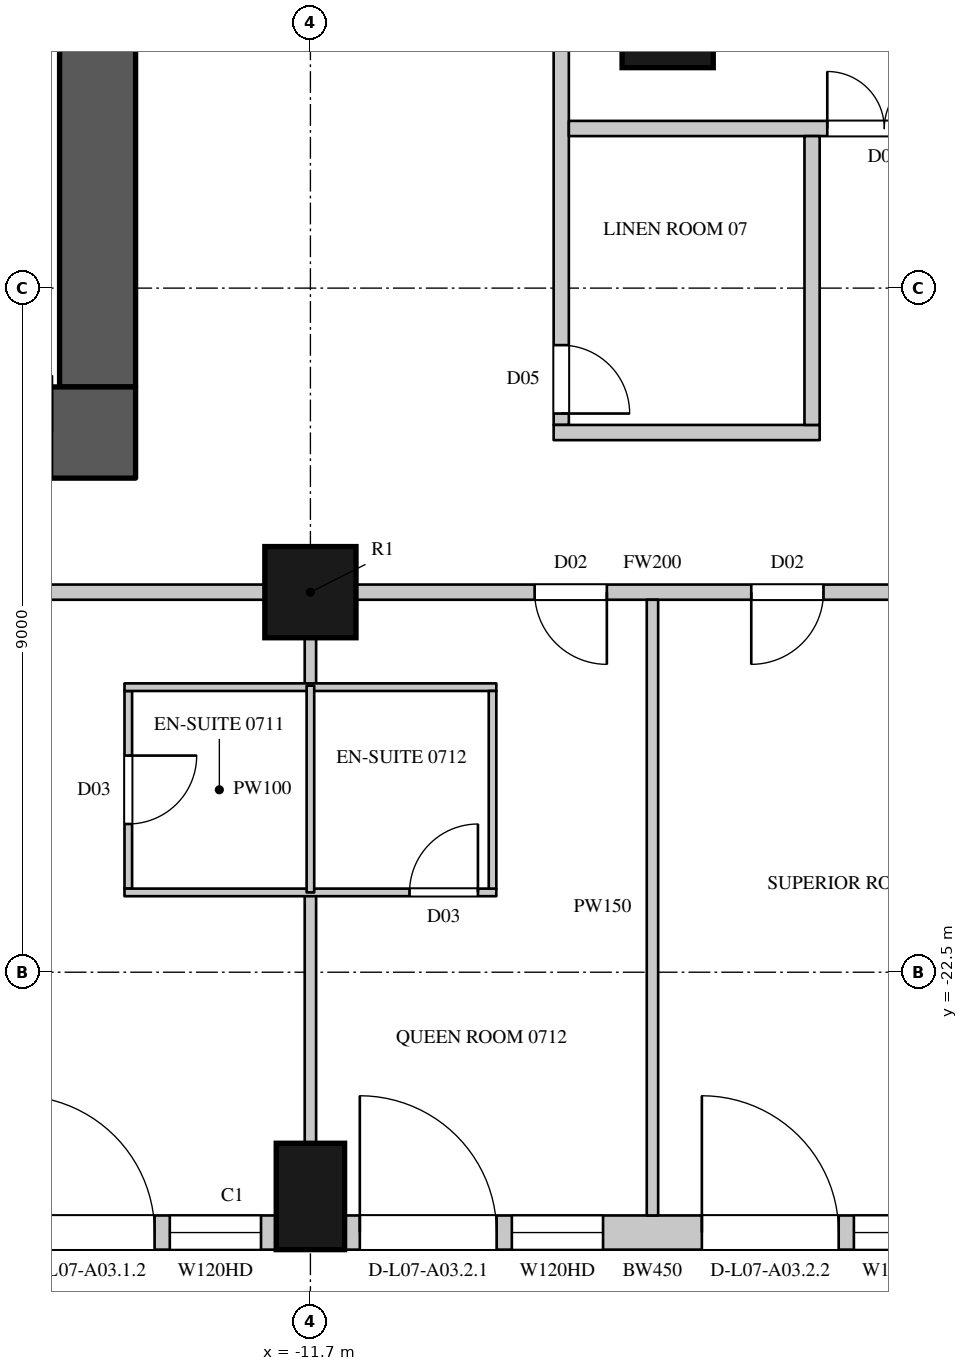
"""IFC4 building model, lengths in metres.
Left out: names, types, materials, properties, quantities, classifications, styles, units other than length and angle.
Written with IfcOpenShell. Run it as: python <this file> out.ifc"""

import sys

from ifc_helpers import new_model, si_unit, direction, frame, frame_2d, origin, origin_2d, place, context, subcontext, project, spatial, rectangle, circle, extrude, element, fill, save


model = new_model("IFC4")
c1 = context("Model", 3, precision=1e-05, world=origin(), true_north=direction((0.0, 1.0)))
c2 = subcontext(c1, "Body", "Model", "MODEL_VIEW")
j1 = project(units=[si_unit("LENGTHUNIT", "METRE"), si_unit("PLANEANGLEUNIT", "RADIAN")], contexts=[c1])
p1 = place(None, origin())
s1 = spatial("IfcSite", under=j1, at=p1, CompositionType="ELEMENT")
p2 = place(p1, origin())
s2 = spatial("IfcBuilding", under=s1, at=p2, CompositionType="ELEMENT")
p3 = place(p2, frame((0.0, 0.0, 55.5)))
s3 = spatial("IfcBuildingStorey", under=s2, at=p3, CompositionType="ELEMENT", Elevation=55.5)
p4 = place(p3, frame((-11.7, -25.45, 0.0), z_axis=(0.0, 0.0, 1.0), x_axis=(1.0, 0.0, 0.0)))
e1 = element("IfcColumn", 1, at=p4, inside=s3, PredefinedType="COLUMN", context=c2, shape_type="SweptSolid", body=[
    extrude(rectangle(XDim=0.9, YDim=1.4, at=origin_2d()), origin(), (0.0, 0.0, 1.0), 3.6),
])
for number, where, z_axis, x_axis in (
    (2, (-11.7, -17.5, 0.0), (0.0, 0.0, 1.0), (1.0, 0.0, 0.0)),
    (3, (-7.0, -10.0, 0.0), (0.0, 0.0, 1.0), (1.0, 0.0, 0.0)),
):
    element("IfcColumn", number, at=place(p3, frame(where, z_axis=z_axis, x_axis=x_axis)), inside=s3, PredefinedType="COLUMN", context=c2, shape_type="SweptSolid", body=[
        extrude(circle(Radius=0.6, at=origin_2d()), origin(), (0.0, 0.0, 1.0), 3.6),
    ])
p5 = place(p3, frame((-20.25, -25.925, 0.0), z_axis=(0.0, 0.0, 1.0), x_axis=(1.0, 0.0, 0.0)))
e4 = element("IfcWall", 4, at=p5, inside=s3, PredefinedType="SOLIDWALL", context=c2, shape_type="SweptSolid", body=[
    extrude(rectangle(XDim=8.1, YDim=0.45, at=frame_2d((4.05, 0.0))), origin(), (0.0, 0.0, 1.0), 3.3),
])
p6 = place(p5, frame((0.2, 0.0, 0.0)))
e5 = element("IfcOpeningElement", 5, at=p6, cuts=e4, PredefinedType="OPENING", context=c2, shape_type="SweptSolid", body=[
    extrude(rectangle(XDim=1.8, YDim=2.4, at=frame_2d((0.9, 1.2))), frame((0.0, 0.235, 0.0), z_axis=(0.0, -1.0, 0.0), x_axis=(1.0, 0.0, 0.0)), (0.0, 0.0, 1.0), 0.47),
])
p7 = place(p5, frame((2.2, 0.0, 1.05)))
e6 = element("IfcOpeningElement", 6, at=p7, cuts=e4, PredefinedType="OPENING", context=c2, shape_type="SweptSolid", body=[
    extrude(rectangle(XDim=1.2, YDim=2.0, at=frame_2d((0.6, 1.0))), frame((0.0, 0.235, 0.0), z_axis=(0.0, -1.0, 0.0), x_axis=(1.0, 0.0, 0.0)), (0.0, 0.0, 1.0), 0.47),
])
p8 = place(p5, frame((4.7, 0.0, 0.0)))
e7 = element("IfcOpeningElement", 7, at=p8, cuts=e4, PredefinedType="OPENING", context=c2, shape_type="SweptSolid", body=[
    extrude(rectangle(XDim=1.8, YDim=2.4, at=frame_2d((0.9, 1.2))), frame((0.0, 0.235, 0.0), z_axis=(0.0, -1.0, 0.0), x_axis=(1.0, 0.0, 0.0)), (0.0, 0.0, 1.0), 0.47),
])
p9 = place(p5, frame((6.7, 0.0, 1.05)))
e8 = element("IfcOpeningElement", 8, at=p9, cuts=e4, PredefinedType="OPENING", context=c2, shape_type="SweptSolid", body=[
    extrude(rectangle(XDim=1.2, YDim=2.0, at=frame_2d((0.6, 1.0))), frame((0.0, 0.235, 0.0), z_axis=(0.0, -1.0, 0.0), x_axis=(1.0, 0.0, 0.0)), (0.0, 0.0, 1.0), 0.47),
])
p10 = place(p3, frame((-11.25, -25.925, 0.0), z_axis=(0.0, 0.0, 1.0), x_axis=(1.0, 0.0, 0.0)))
e9 = element("IfcWall", 9, at=p10, inside=s3, PredefinedType="SOLIDWALL", context=c2, shape_type="SweptSolid", body=[
    extrude(rectangle(XDim=8.1, YDim=0.45, at=frame_2d((4.05, 0.0))), origin(), (0.0, 0.0, 1.0), 3.3),
])
p11 = place(p10, frame((0.2, 0.0, 0.0)))
e10 = element("IfcOpeningElement", 10, at=p11, cuts=e9, PredefinedType="OPENING", context=c2, shape_type="SweptSolid", body=[
    extrude(rectangle(XDim=1.8, YDim=2.4, at=frame_2d((0.9, 1.2))), frame((0.0, 0.235, 0.0), z_axis=(0.0, -1.0, 0.0), x_axis=(1.0, 0.0, 0.0)), (0.0, 0.0, 1.0), 0.47),
])
p12 = place(p10, frame((2.2, 0.0, 1.05)))
e11 = element("IfcOpeningElement", 11, at=p12, cuts=e9, PredefinedType="OPENING", context=c2, shape_type="SweptSolid", body=[
    extrude(rectangle(XDim=1.2, YDim=2.0, at=frame_2d((0.6, 1.0))), frame((0.0, 0.235, 0.0), z_axis=(0.0, -1.0, 0.0), x_axis=(1.0, 0.0, 0.0)), (0.0, 0.0, 1.0), 0.47),
])
p13 = place(p10, frame((4.7, 0.0, 0.0)))
e12 = element("IfcOpeningElement", 12, at=p13, cuts=e9, PredefinedType="OPENING", context=c2, shape_type="SweptSolid", body=[
    extrude(rectangle(XDim=1.8, YDim=2.4, at=frame_2d((0.9, 1.2))), frame((0.0, 0.235, 0.0), z_axis=(0.0, -1.0, 0.0), x_axis=(1.0, 0.0, 0.0)), (0.0, 0.0, 1.0), 0.47),
])
p14 = place(p10, frame((6.7, 0.0, 1.05)))
e13 = element("IfcOpeningElement", 13, at=p14, cuts=e9, PredefinedType="OPENING", context=c2, shape_type="SweptSolid", body=[
    extrude(rectangle(XDim=1.2, YDim=2.0, at=frame_2d((0.6, 1.0))), frame((0.0, 0.235, 0.0), z_axis=(0.0, -1.0, 0.0), x_axis=(1.0, 0.0, 0.0)), (0.0, 0.0, 1.0), 0.47),
])
p15 = place(p3, frame((-30.0, -15.4, 0.0), z_axis=(0.0, 0.0, 1.0), x_axis=(1.0, 0.0, 0.0)))
e14 = element("IfcWall", 14, at=p15, inside=s3, PredefinedType="SHEAR", context=c2, shape_type="SweptSolid", body=[
    extrude(rectangle(XDim=16.0, YDim=1.2, at=frame_2d((8.0, 0.0))), origin(), (0.0, 0.0, 1.0), 3.6),
])
p16 = place(p15, frame((13.4, 0.0, 0.0)))
e15 = element("IfcOpeningElement", 15, at=p16, cuts=e14, PredefinedType="OPENING", context=c2, shape_type="SweptSolid", body=[
    extrude(rectangle(XDim=1.5, YDim=2.4, at=frame_2d((0.75, 1.2))), frame((0.0, 0.61, 0.0), z_axis=(0.0, -1.0, 0.0), x_axis=(1.0, 0.0, 0.0)), (0.0, 0.0, 1.0), 1.22),
])
p17 = place(p3, frame((-14.5, -14.8, 0.0), z_axis=(0.0, 0.0, 1.0), x_axis=(0.0, 1.0, 0.0)))
e16 = element("IfcWall", 16, at=p17, inside=s3, PredefinedType="SHEAR", context=c2, shape_type="SweptSolid", body=[
    extrude(rectangle(XDim=29.6, YDim=1.0, at=frame_2d((14.8, 0.0))), origin(), (0.0, 0.0, 1.0), 3.6),
])
p18 = place(p17, frame((8.45, 0.0, 0.0)))
e17 = element("IfcOpeningElement", 17, at=p18, cuts=e16, PredefinedType="OPENING", context=c2, shape_type="SweptSolid", body=[
    extrude(rectangle(XDim=1.5, YDim=2.4, at=frame_2d((0.75, 1.2))), frame((0.0, 0.51, 0.0), z_axis=(0.0, -1.0, 0.0), x_axis=(1.0, 0.0, 0.0)), (0.0, 0.0, 1.0), 1.02),
])
p19 = place(p17, frame((19.65, 0.0, 0.0)))
e18 = element("IfcOpeningElement", 18, at=p19, cuts=e16, PredefinedType="OPENING", context=c2, shape_type="SweptSolid", body=[
    extrude(rectangle(XDim=1.5, YDim=2.4, at=frame_2d((0.75, 1.2))), frame((0.0, 0.51, 0.0), z_axis=(0.0, -1.0, 0.0), x_axis=(1.0, 0.0, 0.0)), (0.0, 0.0, 1.0), 1.02),
])
p20 = place(p17, frame((14.5, 0.0, 0.0)))
e19 = element("IfcOpeningElement", 19, at=p20, cuts=e16, PredefinedType="OPENING", context=c2, shape_type="SweptSolid", body=[
    extrude(rectangle(XDim=0.6, YDim=2.0, at=frame_2d((0.3, 1.0))), frame((0.0, 0.51, 0.0), z_axis=(0.0, -1.0, 0.0), x_axis=(1.0, 0.0, 0.0)), (0.0, 0.0, 1.0), 1.02),
])
p21 = place(p3, frame((-18.8, -17.5, 0.0), z_axis=(0.0, 0.0, 1.0), x_axis=(1.0, 0.0, 0.0)))
e20 = element("IfcWall", 20, at=p21, inside=s3, PredefinedType="PARTITIONING", context=c2, shape_type="SweptSolid", body=[
    extrude(rectangle(XDim=6.5, YDim=0.2, at=frame_2d((3.25, 0.0))), origin(), (0.0, 0.0, 1.0), 2.75),
])
p22 = place(p3, frame((-11.1, -17.5, 0.0), z_axis=(0.0, 0.0, 1.0), x_axis=(1.0, 0.0, 0.0)))
e21 = element("IfcWall", 21, at=p22, inside=s3, PredefinedType="PARTITIONING", context=c2, shape_type="SweptSolid", body=[
    extrude(rectangle(XDim=7.8, YDim=0.2, at=frame_2d((3.9, 0.0))), origin(), (0.0, 0.0, 1.0), 2.75),
])
p23 = place(p22, frame((2.35, 0.0, 0.0)))
e22 = element("IfcOpeningElement", 22, at=p23, cuts=e21, PredefinedType="OPENING", context=c2, shape_type="SweptSolid", body=[
    extrude(rectangle(XDim=0.95, YDim=2.2, at=frame_2d((0.475, 1.1))), frame((0.0, 0.11, 0.0), z_axis=(0.0, -1.0, 0.0), x_axis=(1.0, 0.0, 0.0)), (0.0, 0.0, 1.0), 0.22),
])
p24 = place(p22, frame((5.2, 0.0, 0.0)))
e23 = element("IfcOpeningElement", 23, at=p24, cuts=e21, PredefinedType="OPENING", context=c2, shape_type="SweptSolid", body=[
    extrude(rectangle(XDim=0.95, YDim=2.2, at=frame_2d((0.475, 1.1))), frame((0.0, 0.11, 0.0), z_axis=(0.0, -1.0, 0.0), x_axis=(1.0, 0.0, 0.0)), (0.0, 0.0, 1.0), 0.22),
])
p25 = place(p3, frame((-8.4, -15.3, 0.0), z_axis=(0.0, 0.0, 1.0), x_axis=(0.0, 1.0, 0.0)))
e24 = element("IfcWall", 24, at=p25, inside=s3, PredefinedType="PARTITIONING", context=c2, shape_type="SweptSolid", body=[
    extrude(rectangle(XDim=30.6, YDim=0.2, at=frame_2d((15.3, 0.0))), origin(), (0.0, 0.0, 1.0), 3.3),
])
p26 = place(p25, frame((19.05, 0.0, 0.0)))
e25 = element("IfcOpeningElement", 25, at=p26, cuts=e24, PredefinedType="OPENING", context=c2, shape_type="SweptSolid", body=[
    extrude(rectangle(XDim=1.5, YDim=2.2, at=frame_2d((0.75, 1.1))), frame((0.0, 0.11, 0.0), z_axis=(0.0, -1.0, 0.0), x_axis=(1.0, 0.0, 0.0)), (0.0, 0.0, 1.0), 0.22),
])
p27 = place(p25, frame((29.55, 0.0, 0.0)))
e26 = element("IfcOpeningElement", 26, at=p27, cuts=e24, PredefinedType="OPENING", context=c2, shape_type="SweptSolid", body=[
    extrude(rectangle(XDim=0.9, YDim=2.2, at=frame_2d((0.45, 1.1))), frame((0.0, 0.11, 0.0), z_axis=(0.0, -1.0, 0.0), x_axis=(1.0, 0.0, 0.0)), (0.0, 0.0, 1.0), 0.22),
])
p28 = place(p25, frame((0.15, 0.0, 0.0)))
e27 = element("IfcOpeningElement", 27, at=p28, cuts=e24, PredefinedType="OPENING", context=c2, shape_type="SweptSolid", body=[
    extrude(rectangle(XDim=0.9, YDim=2.2, at=frame_2d((0.45, 1.1))), frame((0.0, 0.11, 0.0), z_axis=(0.0, -1.0, 0.0), x_axis=(1.0, 0.0, 0.0)), (0.0, 0.0, 1.0), 0.22),
])
p29 = place(p3, frame((-8.5, -15.4, 0.0), z_axis=(0.0, 0.0, 1.0), x_axis=(1.0, 0.0, 0.0)))
e28 = element("IfcWall", 28, at=p29, inside=s3, PredefinedType="PARTITIONING", context=c2, shape_type="SweptSolid", body=[
    extrude(rectangle(XDim=3.5, YDim=0.2, at=frame_2d((1.75, 0.0))), origin(), (0.0, 0.0, 1.0), 3.3),
])
p30 = place(p3, frame((-8.3, -11.4, 0.0), z_axis=(0.0, 0.0, 1.0), x_axis=(1.0, 0.0, 0.0)))
e29 = element("IfcWall", 29, at=p30, inside=s3, PredefinedType="PARTITIONING", context=c2, shape_type="SweptSolid", body=[
    extrude(rectangle(XDim=18.7, YDim=0.2, at=frame_2d((9.35, 0.0))), origin(), (0.0, 0.0, 1.0), 3.3),
])
p31 = place(p30, frame((3.4, 0.0, 0.0)))
e30 = element("IfcOpeningElement", 30, at=p31, cuts=e29, PredefinedType="OPENING", context=c2, shape_type="SweptSolid", body=[
    extrude(rectangle(XDim=1.5, YDim=2.2, at=frame_2d((0.75, 1.1))), frame((0.0, 0.11, 0.0), z_axis=(0.0, -1.0, 0.0), x_axis=(1.0, 0.0, 0.0)), (0.0, 0.0, 1.0), 0.22),
])
p32 = place(p3, frame((-5.1, -15.3, 0.0), z_axis=(0.0, 0.0, 1.0), x_axis=(0.0, 1.0, 0.0)))
e31 = element("IfcWall", 31, at=p32, inside=s3, PredefinedType="PARTITIONING", context=c2, shape_type="SweptSolid", body=[
    extrude(rectangle(XDim=3.8, YDim=0.2, at=frame_2d((1.9, 0.0))), origin(), (0.0, 0.0, 1.0), 3.3),
])
p33 = place(p3, frame((-11.7, -24.75, 0.0), z_axis=(0.0, 0.0, 1.0), x_axis=(0.0, 1.0, 0.0)))
e32 = element("IfcWall", 32, at=p33, inside=s3, PredefinedType="PARTITIONING", context=c2, shape_type="SweptSolid", body=[
    extrude(rectangle(XDim=3.3, YDim=0.15, at=frame_2d((1.65, 0.0))), origin(), (0.0, 0.0, 1.0), 2.75),
])
p34 = place(p3, frame((-11.7, -18.73, 0.0), z_axis=(0.0, 0.0, 1.0), x_axis=(0.0, 1.0, 0.0)))
e33 = element("IfcWall", 33, at=p34, inside=s3, PredefinedType="PARTITIONING", context=c2, shape_type="SweptSolid", body=[
    extrude(rectangle(XDim=0.63, YDim=0.15, at=frame_2d((0.315, 0.0))), origin(), (0.0, 0.0, 1.0), 2.75),
])
p35 = place(p3, frame((-7.2, -25.7, 0.0), z_axis=(0.0, 0.0, 1.0), x_axis=(0.0, 1.0, 0.0)))
e34 = element("IfcWall", 34, at=p35, inside=s3, PredefinedType="PARTITIONING", context=c2, shape_type="SweptSolid", body=[
    extrude(rectangle(XDim=8.1, YDim=0.15, at=frame_2d((4.05, 0.0))), origin(), (0.0, 0.0, 1.0), 2.65),
])
p36 = place(p3, frame((-14.096, -21.4, 0.0), z_axis=(0.0, 0.0, 1.0), x_axis=(0.0, 1.0, 0.0)))
e35 = element("IfcWall", 35, at=p36, inside=s3, PredefinedType="PARTITIONING", context=c2, shape_type="SweptSolid", body=[
    extrude(rectangle(XDim=2.6, YDim=0.1, at=frame_2d((1.3, 0.0))), origin(), (0.0, 0.0, 1.0), 3.3),
])
p37 = place(p36, frame((0.85, 0.0, 0.0)))
e36 = element("IfcOpeningElement", 36, at=p37, cuts=e35, PredefinedType="OPENING", context=c2, shape_type="SweptSolid", body=[
    extrude(rectangle(XDim=0.9, YDim=2.2, at=frame_2d((0.45, 1.1))), frame((0.0, 0.06, 0.0), z_axis=(0.0, -1.0, 0.0), x_axis=(1.0, 0.0, 0.0)), (0.0, 0.0, 1.0), 0.12),
])
p38 = place(p3, frame((-14.146, -21.45, 0.0), z_axis=(0.0, 0.0, 1.0), x_axis=(1.0, 0.0, 0.0)))
e37 = element("IfcWall", 37, at=p38, inside=s3, PredefinedType="PARTITIONING", context=c2, shape_type="SweptSolid", body=[
    extrude(rectangle(XDim=4.892, YDim=0.1, at=frame_2d((2.446, 0.0))), origin(), (0.0, 0.0, 1.0), 3.3),
])
p39 = place(p38, frame((3.75, 0.0, 0.0)))
e38 = element("IfcOpeningElement", 38, at=p39, cuts=e37, PredefinedType="OPENING", context=c2, shape_type="SweptSolid", body=[
    extrude(rectangle(XDim=0.9, YDim=2.2, at=frame_2d((0.45, 1.1))), frame((0.0, 0.06, 0.0), z_axis=(0.0, -1.0, 0.0), x_axis=(1.0, 0.0, 0.0)), (0.0, 0.0, 1.0), 0.12),
])
p40 = place(p3, frame((-14.146, -18.75, 0.0), z_axis=(0.0, 0.0, 1.0), x_axis=(1.0, 0.0, 0.0)))
e39 = element("IfcWall", 39, at=p40, inside=s3, PredefinedType="PARTITIONING", context=c2, shape_type="SweptSolid", body=[
    extrude(rectangle(XDim=4.892, YDim=0.1, at=frame_2d((2.446, 0.0))), origin(), (0.0, 0.0, 1.0), 3.3),
])
p41 = place(p3, frame((-11.7, -21.45, 0.0), z_axis=(0.0, 0.0, 1.0), x_axis=(0.0, 1.0, 0.0)))
e40 = element("IfcWall", 40, at=p41, inside=s3, PredefinedType="PARTITIONING", context=c2, shape_type="SweptSolid", body=[
    extrude(rectangle(XDim=2.72, YDim=0.1, at=frame_2d((1.36, 0.0))), origin(), (0.0, 0.0, 1.0), 2.75),
])
p42 = place(p3, frame((-9.304, -21.4, 0.0), z_axis=(0.0, 0.0, 1.0), x_axis=(0.0, 1.0, 0.0)))
e41 = element("IfcWall", 41, at=p42, inside=s3, PredefinedType="PARTITIONING", context=c2, shape_type="SweptSolid", body=[
    extrude(rectangle(XDim=2.6, YDim=0.1, at=frame_2d((1.3, 0.0))), origin(), (0.0, 0.0, 1.0), 3.3),
])
p43 = place(p8, origin())
e42 = element("IfcDoor", 42, at=p43, inside=s3, OperationType="SLIDING_TO_LEFT", PredefinedType="DOOR", context=c2, shape_type="SweptSolid", body=[
    extrude(rectangle(XDim=1.8, YDim=2.4, at=frame_2d((0.9, 1.2))), frame((0.0, 0.13, 0.0), z_axis=(0.0, -1.0, 0.0), x_axis=(1.0, 0.0, 0.0)), (0.0, 0.0, 1.0), 0.05),
])
fill(e7, e42)
p44 = place(p9, origin())
e43 = element("IfcWindow", 43, at=p44, inside=s3, PartitioningType="SINGLE_PANEL", PredefinedType="WINDOW", context=c2, shape_type="SweptSolid", body=[
    extrude(rectangle(XDim=1.2, YDim=2.0, at=frame_2d((0.6, 1.0))), frame((0.0, 0.135, 0.0), z_axis=(0.0, -1.0, 0.0), x_axis=(1.0, 0.0, 0.0)), (0.0, 0.0, 1.0), 0.06),
])
fill(e8, e43)
p45 = place(p11, origin())
e44 = element("IfcDoor", 44, at=p45, inside=s3, OperationType="SLIDING_TO_LEFT", PredefinedType="DOOR", context=c2, shape_type="SweptSolid", body=[
    extrude(rectangle(XDim=1.8, YDim=2.4, at=frame_2d((0.9, 1.2))), frame((0.0, 0.13, 0.0), z_axis=(0.0, -1.0, 0.0), x_axis=(1.0, 0.0, 0.0)), (0.0, 0.0, 1.0), 0.05),
])
fill(e10, e44)
p46 = place(p12, origin())
e45 = element("IfcWindow", 45, at=p46, inside=s3, PartitioningType="SINGLE_PANEL", PredefinedType="WINDOW", context=c2, shape_type="SweptSolid", body=[
    extrude(rectangle(XDim=1.2, YDim=2.0, at=frame_2d((0.6, 1.0))), frame((0.0, 0.135, 0.0), z_axis=(0.0, -1.0, 0.0), x_axis=(1.0, 0.0, 0.0)), (0.0, 0.0, 1.0), 0.06),
])
fill(e11, e45)
p47 = place(p13, origin())
e46 = element("IfcDoor", 46, at=p47, inside=s3, OperationType="SLIDING_TO_LEFT", PredefinedType="DOOR", context=c2, shape_type="SweptSolid", body=[
    extrude(rectangle(XDim=1.8, YDim=2.4, at=frame_2d((0.9, 1.2))), frame((0.0, 0.13, 0.0), z_axis=(0.0, -1.0, 0.0), x_axis=(1.0, 0.0, 0.0)), (0.0, 0.0, 1.0), 0.05),
])
fill(e12, e46)
p48 = place(p14, origin())
e47 = element("IfcWindow", 47, at=p48, inside=s3, PartitioningType="SINGLE_PANEL", PredefinedType="WINDOW", context=c2, shape_type="SweptSolid", body=[
    extrude(rectangle(XDim=1.2, YDim=2.0, at=frame_2d((0.6, 1.0))), frame((0.0, 0.135, 0.0), z_axis=(0.0, -1.0, 0.0), x_axis=(1.0, 0.0, 0.0)), (0.0, 0.0, 1.0), 0.06),
])
fill(e13, e47)
p49 = place(p31, origin())
e48 = element("IfcDoor", 48, at=p49, inside=s3, OperationType="DOUBLE_DOOR_SINGLE_SWING", PredefinedType="DOOR", context=c2, shape_type="SweptSolid", body=[
    extrude(rectangle(XDim=1.5, YDim=2.2, at=frame_2d((0.75, 1.1))), frame((0.0, 0.025, 0.0), z_axis=(0.0, -1.0, 0.0), x_axis=(1.0, 0.0, 0.0)), (0.0, 0.0, 1.0), 0.05),
])
fill(e30, e48)
p50 = place(p28, origin())
e49 = element("IfcDoor", 49, at=p50, inside=s3, OperationType="SINGLE_SWING_RIGHT", PredefinedType="DOOR", context=c2, shape_type="SweptSolid", body=[
    extrude(rectangle(XDim=0.9, YDim=2.2, at=frame_2d((0.45, 1.1))), frame((0.0, 0.025, 0.0), z_axis=(0.0, -1.0, 0.0), x_axis=(1.0, 0.0, 0.0)), (0.0, 0.0, 1.0), 0.05),
])
fill(e27, e49)
p51 = place(p37, origin())
e50 = element("IfcDoor", 50, at=p51, inside=s3, OperationType="SINGLE_SWING_LEFT", PredefinedType="DOOR", context=c2, shape_type="SweptSolid", body=[
    extrude(rectangle(XDim=0.9, YDim=2.2, at=frame_2d((0.45, 1.1))), frame((0.0, 0.025, 0.0), z_axis=(0.0, -1.0, 0.0), x_axis=(1.0, 0.0, 0.0)), (0.0, 0.0, 1.0), 0.05),
])
fill(e36, e50)
p52 = place(p23, origin())
e51 = element("IfcDoor", 51, at=p52, inside=s3, OperationType="SINGLE_SWING_LEFT", PredefinedType="DOOR", context=c2, shape_type="SweptSolid", body=[
    extrude(rectangle(XDim=0.95, YDim=2.2, at=frame_2d((0.475, 1.1))), frame((0.0, 0.025, 0.0), z_axis=(0.0, -1.0, 0.0), x_axis=(1.0, 0.0, 0.0)), (0.0, 0.0, 1.0), 0.05),
])
fill(e22, e51)
p53 = place(p39, origin())
e52 = element("IfcDoor", 52, at=p53, inside=s3, OperationType="SINGLE_SWING_RIGHT", PredefinedType="DOOR", context=c2, shape_type="SweptSolid", body=[
    extrude(rectangle(XDim=0.9, YDim=2.2, at=frame_2d((0.45, 1.1))), frame((0.0, 0.025, 0.0), z_axis=(0.0, -1.0, 0.0), x_axis=(1.0, 0.0, 0.0)), (0.0, 0.0, 1.0), 0.05),
])
fill(e38, e52)
p54 = place(p24, origin())
e53 = element("IfcDoor", 53, at=p54, inside=s3, OperationType="SINGLE_SWING_RIGHT", PredefinedType="DOOR", context=c2, shape_type="SweptSolid", body=[
    extrude(rectangle(XDim=0.95, YDim=2.2, at=frame_2d((0.475, 1.1))), frame((0.0, 0.025, 0.0), z_axis=(0.0, -1.0, 0.0), x_axis=(1.0, 0.0, 0.0)), (0.0, 0.0, 1.0), 0.05),
])
fill(e23, e53)
save(model, sys.argv[1])
